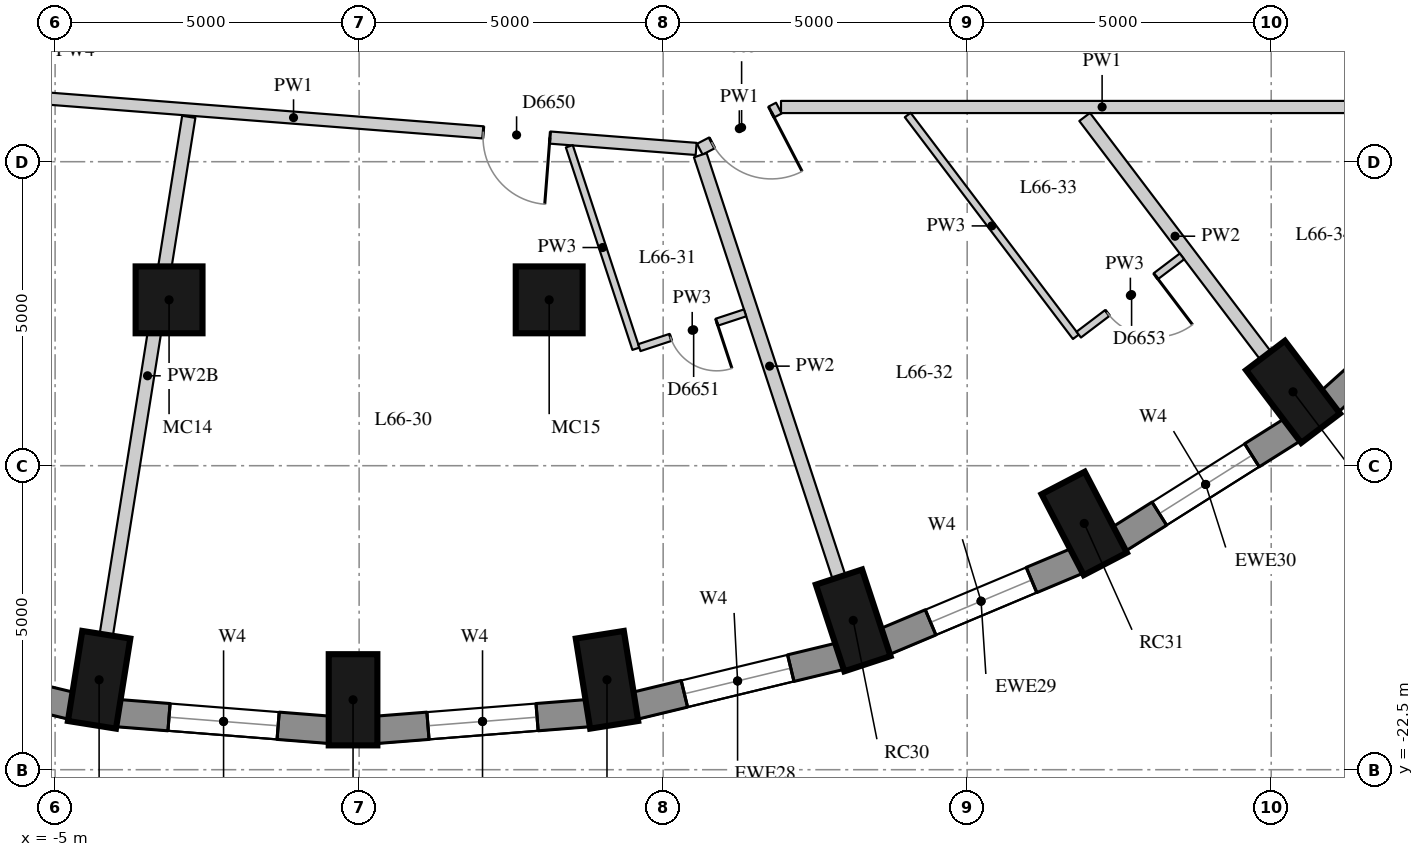
"""IFC4 building model, lengths in metres.
Left out: names, types, materials, properties, quantities, classifications, styles, units other than length and angle.
Written with IfcOpenShell. Run it as: python <this file> out.ifc"""

import sys

from ifc_helpers import new_model, si_unit, direction, frame, frame_2d, origin, origin_2d, place, context, subcontext, project, spatial, rectangle, extrude, element, fill, save


model = new_model("IFC4")
c1 = context("Model", 3, precision=1e-05, world=origin(), true_north=direction((0.0, 1.0)))
c2 = subcontext(c1, "Body", "Model", "MODEL_VIEW")
j1 = project(units=[si_unit("LENGTHUNIT", "METRE"), si_unit("PLANEANGLEUNIT", "RADIAN")], contexts=[c1])
p1 = place(None, origin())
s1 = spatial("IfcSite", under=j1, at=p1, CompositionType="ELEMENT")
p2 = place(p1, origin())
s2 = spatial("IfcBuilding", under=s1, at=p2, CompositionType="ELEMENT")
p3 = place(p2, frame((0.0, 0.0, 233.3)))
s3 = spatial("IfcBuildingStorey", under=s2, at=p3, CompositionType="ELEMENT", Elevation=233.3)
for number, where, z_axis, x_axis in (
    (1, (-4.276, -21.021, 0.0), (0.0, 0.0, 1.0), (-0.157, -0.988, 0.0)),
    (2, (-0.1, -21.35, 0.0), (0.0, 0.0, 1.0), (0.0, -1.0, 0.0)),
    (3, (4.076, -21.021, 0.0), (0.0, 0.0, 1.0), (0.157, -0.988, 0.0)),
    (4, (8.125, -20.044, 0.0), (0.0, 0.0, 1.0), (0.312, -0.95, 0.0)),
    (5, (11.925, -18.449, 0.0), (0.0, 0.0, 1.0), (0.462, -0.887, 0.0)),
    (6, (15.359, -16.285, 0.0), (0.0, 0.0, 1.0), (0.604, -0.797, 0.0)),
):
    element("IfcColumn", number, at=place(p3, frame(where, z_axis=z_axis, x_axis=x_axis)), inside=s3, PredefinedType="COLUMN", context=c2, shape_type="SweptSolid", body=[
        extrude(rectangle(XDim=1.5, YDim=0.8, at=origin_2d()), origin(), (0.0, 0.0, 1.0), 3.3),
    ])
for number, where, z_axis, x_axis in (
    (7, (-3.126, -14.772, 0.0), (0.0, 0.0, 1.0), (1.0, 0.0, 0.0)),
    (8, (3.126, -14.772, 0.0), (0.0, 0.0, 1.0), (1.0, 0.0, 0.0)),
):
    element("IfcColumn", number, at=place(p3, frame(where, z_axis=z_axis, x_axis=x_axis)), inside=s3, PredefinedType="COLUMN", context=c2, shape_type="SweptSolid", body=[
        extrude(rectangle(XDim=1.1, YDim=1.1, at=origin_2d()), origin(), (0.0, 0.0, 1.0), 3.3),
    ])
p4 = place(p3, frame((-8.119, -20.632, 0.0), z_axis=(0.0, 0.0, 1.0), x_axis=(0.972115243017, -0.234503633859, 0.0)))
e9 = element("IfcWall", 9, at=p4, inside=s3, PredefinedType="SOLIDWALL", context=c2, shape_type="SweptSolid", body=[
    extrude(rectangle(XDim=3.487, YDim=0.45, at=frame_2d((1.743, 0.0))), origin(), (0.0, 0.0, 1.0), 3.02),
])
p5 = place(p4, frame((0.843, 0.0, 0.4)))
e10 = element("IfcOpeningElement", 10, at=p5, cuts=e9, PredefinedType="OPENING", context=c2, shape_type="SweptSolid", body=[
    extrude(rectangle(XDim=1.8, YDim=1.75, at=frame_2d((0.9, 0.875))), frame((0.0, 0.235, 0.0), z_axis=(0.0, -1.0, 0.0), x_axis=(1.0, 0.0, 0.0)), (0.0, 0.0, 1.0), 0.47),
])
p6 = place(p3, frame((-3.979, -21.569, 0.0), z_axis=(0.0, 0.0, 1.0), x_axis=(0.996910775835, -0.078542377245, 0.0)))
e11 = element("IfcWall", 11, at=p6, inside=s3, PredefinedType="SOLIDWALL", context=c2, shape_type="SweptSolid", body=[
    extrude(rectangle(XDim=3.509, YDim=0.45, at=frame_2d((1.755, 0.0))), origin(), (0.0, 0.0, 1.0), 3.02),
])
p7 = place(p6, frame((0.855, 0.0, 0.4)))
e12 = element("IfcOpeningElement", 12, at=p7, cuts=e11, PredefinedType="OPENING", context=c2, shape_type="SweptSolid", body=[
    extrude(rectangle(XDim=1.8, YDim=1.75, at=frame_2d((0.9, 0.875))), frame((0.0, 0.235, 0.0), z_axis=(0.0, -1.0, 0.0), x_axis=(1.0, 0.0, 0.0)), (0.0, 0.0, 1.0), 0.47),
])
p8 = place(p3, frame((0.28, -21.844, 0.0), z_axis=(0.0, 0.0, 1.0), x_axis=(0.996910775835, 0.078542377245, 0.0)))
e13 = element("IfcWall", 13, at=p8, inside=s3, PredefinedType="SOLIDWALL", context=c2, shape_type="SweptSolid", body=[
    extrude(rectangle(XDim=3.509, YDim=0.45, at=frame_2d((1.755, 0.0))), origin(), (0.0, 0.0, 1.0), 3.02),
])
p9 = place(p8, frame((0.855, 0.0, 0.4)))
e14 = element("IfcOpeningElement", 14, at=p9, cuts=e13, PredefinedType="OPENING", context=c2, shape_type="SweptSolid", body=[
    extrude(rectangle(XDim=1.8, YDim=1.75, at=frame_2d((0.9, 0.875))), frame((0.0, 0.235, 0.0), z_axis=(0.0, -1.0, 0.0), x_axis=(1.0, 0.0, 0.0)), (0.0, 0.0, 1.0), 0.47),
])
p10 = place(p3, frame((4.529, -21.449, 0.0), z_axis=(0.0, 0.0, 1.0), x_axis=(0.972115243017, 0.234503633859, 0.0)))
e15 = element("IfcWall", 15, at=p10, inside=s3, PredefinedType="SOLIDWALL", context=c2, shape_type="SweptSolid", body=[
    extrude(rectangle(XDim=3.487, YDim=0.45, at=frame_2d((1.743, 0.0))), origin(), (0.0, 0.0, 1.0), 3.02),
])
p11 = place(p10, frame((0.843, 0.0, 0.4)))
e16 = element("IfcOpeningElement", 16, at=p11, cuts=e15, PredefinedType="OPENING", context=c2, shape_type="SweptSolid", body=[
    extrude(rectangle(XDim=1.8, YDim=1.75, at=frame_2d((0.9, 0.875))), frame((0.0, 0.235, 0.0), z_axis=(0.0, -1.0, 0.0), x_axis=(1.0, 0.0, 0.0)), (0.0, 0.0, 1.0), 0.47),
])
p12 = place(p3, frame((8.641, -20.395, 0.0), z_axis=(0.0, 0.0, 1.0), x_axis=(0.922049934692, 0.3870709469, 0.0)))
e17 = element("IfcWall", 17, at=p12, inside=s3, PredefinedType="SOLIDWALL", context=c2, shape_type="SweptSolid", body=[
    extrude(rectangle(XDim=3.443, YDim=0.45, at=frame_2d((1.722, 0.0))), origin(), (0.0, 0.0, 1.0), 3.02),
])
p13 = place(p12, frame((0.822, 0.0, 0.4)))
e18 = element("IfcOpeningElement", 18, at=p13, cuts=e17, PredefinedType="OPENING", context=c2, shape_type="SweptSolid", body=[
    extrude(rectangle(XDim=1.8, YDim=1.75, at=frame_2d((0.9, 0.875))), frame((0.0, 0.235, 0.0), z_axis=(0.0, -1.0, 0.0), x_axis=(1.0, 0.0, 0.0)), (0.0, 0.0, 1.0), 0.47),
])
p14 = place(p3, frame((12.49, -18.711, 0.0), z_axis=(0.0, 0.0, 1.0), x_axis=(0.845929139811, 0.53329531258, 0.0)))
e19 = element("IfcWall", 19, at=p14, inside=s3, PredefinedType="SOLIDWALL", context=c2, shape_type="SweptSolid", body=[
    extrude(rectangle(XDim=3.385, YDim=0.45, at=frame_2d((1.692, 0.0))), origin(), (0.0, 0.0, 1.0), 3.02),
])
p15 = place(p14, frame((0.792, 0.0, 0.4)))
e20 = element("IfcOpeningElement", 20, at=p15, cuts=e19, PredefinedType="OPENING", context=c2, shape_type="SweptSolid", body=[
    extrude(rectangle(XDim=1.8, YDim=1.75, at=frame_2d((0.9, 0.875))), frame((0.0, 0.235, 0.0), z_axis=(0.0, -1.0, 0.0), x_axis=(1.0, 0.0, 0.0)), (0.0, 0.0, 1.0), 0.47),
])
p16 = place(p3, frame((15.959, -16.448, 0.0), z_axis=(0.0, 0.0, 1.0), x_axis=(0.743166014219, 0.669107073128, 0.0)))
e21 = element("IfcWall", 21, at=p16, inside=s3, PredefinedType="SOLIDWALL", context=c2, shape_type="SweptSolid", body=[
    extrude(rectangle(XDim=3.316, YDim=0.45, at=frame_2d((1.658, 0.0))), origin(), (0.0, 0.0, 1.0), 3.02),
])
p17 = place(p3, frame((17.5, -11.6, 0.0), z_axis=(0.0, 0.0, 1.0), x_axis=(-1.0, 0.0, 0.0)))
e22 = element("IfcWall", 22, at=p17, inside=s3, PredefinedType="PARTITIONING", context=c2, shape_type="SweptSolid", body=[
    extrude(rectangle(XDim=10.562, YDim=0.2, at=frame_2d((5.281, 0.0))), origin(), (0.0, 0.0, 1.0), 3.02),
])
p18 = place(p3, frame((6.903, -11.619, 0.0), z_axis=(0.0, 0.0, 1.0), x_axis=(-0.887353179844, -0.461090375329, 0.0)))
e23 = element("IfcWall", 23, at=p18, inside=s3, PredefinedType="PARTITIONING", context=c2, shape_type="SweptSolid", body=[
    extrude(rectangle(XDim=1.465, YDim=0.2, at=frame_2d((0.732, 0.0))), origin(), (0.0, 0.0, 1.0), 3.02),
])
p19 = place(p18, frame((0.14, 0.0, 0.0)))
e24 = element("IfcOpeningElement", 24, at=p19, cuts=e23, PredefinedType="OPENING", context=c2, shape_type="SweptSolid", body=[
    extrude(rectangle(XDim=1.1, YDim=2.1, at=frame_2d((0.55, 1.05))), frame((0.0, 0.11, 0.0), z_axis=(0.0, -1.0, 0.0), x_axis=(1.0, 0.0, 0.0)), (0.0, 0.0, 1.0), 0.22),
])
p20 = place(p3, frame((5.542, -12.29, 0.0), z_axis=(0.0, 0.0, 1.0), x_axis=(-0.996994281558, 0.077475173702, 0.0)))
e25 = element("IfcWall", 25, at=p20, inside=s3, PredefinedType="PARTITIONING", context=c2, shape_type="SweptSolid", body=[
    extrude(rectangle(XDim=13.282, YDim=0.2, at=frame_2d((6.641, 0.0))), origin(), (0.0, 0.0, 1.0), 3.02),
])
p21 = place(p20, frame((2.412, 0.0, 0.0)))
e26 = element("IfcOpeningElement", 26, at=p21, cuts=e25, PredefinedType="OPENING", context=c2, shape_type="SweptSolid", body=[
    extrude(rectangle(XDim=1.1, YDim=2.1, at=frame_2d((0.55, 1.05))), frame((0.0, 0.11, 0.0), z_axis=(0.0, -1.0, 0.0), x_axis=(1.0, 0.0, 0.0)), (0.0, 0.0, 1.0), 0.22),
])
p22 = place(p3, frame((-4.158, -20.281, 0.0), z_axis=(0.0, 0.0, 1.0), x_axis=(0.157248675007, 0.987559038341, 0.0)))
e27 = element("IfcWall", 27, at=p22, inside=s3, PredefinedType="PARTITIONING", context=c2, shape_type="SweptSolid", body=[
    extrude(rectangle(XDim=8.626, YDim=0.22, at=frame_2d((4.313, 0.0))), origin(), (0.0, 0.0, 1.0), 2.57),
])
p23 = place(p3, frame((7.891, -19.332, 0.0), z_axis=(0.0, 0.0, 1.0), x_axis=(-0.312264049527, 0.949995349132, 0.0)))
e28 = element("IfcWall", 28, at=p23, inside=s3, PredefinedType="PARTITIONING", context=c2, shape_type="SweptSolid", body=[
    extrude(rectangle(XDim=7.304, YDim=0.22, at=frame_2d((3.652, 0.0))), origin(), (0.0, 0.0, 1.0), 3.02),
])
p24 = place(p3, frame((14.906, -15.687, 0.0), z_axis=(0.0, 0.0, 1.0), x_axis=(-0.604078206052, 0.796925041, 0.0)))
e29 = element("IfcWall", 29, at=p24, inside=s3, PredefinedType="PARTITIONING", context=c2, shape_type="SweptSolid", body=[
    extrude(rectangle(XDim=4.923, YDim=0.22, at=frame_2d((2.462, 0.0))), origin(), (0.0, 0.0, 1.0), 3.02),
])
p25 = place(p3, frame((3.457, -12.246, 0.0), z_axis=(0.0, 0.0, 1.0), x_axis=(0.312255646562, -0.949998111151, 0.0)))
e30 = element("IfcWall", 30, at=p25, inside=s3, PredefinedType="PARTITIONING", context=c2, shape_type="SweptSolid", body=[
    extrude(rectangle(XDim=3.506, YDim=0.12, at=frame_2d((1.753, 0.0))), origin(), (0.0, 0.0, 1.0), 3.02),
])
p26 = place(p3, frame((9.022, -11.732, 0.0), z_axis=(0.0, 0.0, 1.0), x_axis=(0.604079451594, -0.796924096863, 0.0)))
e31 = element("IfcWall", 31, at=p26, inside=s3, PredefinedType="PARTITIONING", context=c2, shape_type="SweptSolid", body=[
    extrude(rectangle(XDim=4.578, YDim=0.12, at=frame_2d((2.289, 0.0))), origin(), (0.0, 0.0, 1.0), 3.02),
])
p27 = place(p3, frame((4.608, -15.558, 0.0), z_axis=(0.0, 0.0, 1.0), x_axis=(0.949995576072, 0.312263359111, 0.0)))
e32 = element("IfcWall", 32, at=p27, inside=s3, PredefinedType="PARTITIONING", context=c2, shape_type="SweptSolid", body=[
    extrude(rectangle(XDim=1.83, YDim=0.12, at=frame_2d((0.915, 0.0))), origin(), (0.0, 0.0, 1.0), 3.02),
])
p28 = place(p27, frame((0.54, 0.0, 0.0)))
e33 = element("IfcOpeningElement", 33, at=p28, cuts=e32, PredefinedType="OPENING", context=c2, shape_type="SweptSolid", body=[
    extrude(rectangle(XDim=0.8, YDim=2.1, at=frame_2d((0.4, 1.05))), frame((0.0, 0.07, 0.0), z_axis=(0.0, -1.0, 0.0), x_axis=(1.0, 0.0, 0.0)), (0.0, 0.0, 1.0), 0.14),
])
p29 = place(p3, frame((11.835, -15.344, 0.0), z_axis=(0.0, 0.0, 1.0), x_axis=(0.79693666797, 0.604062866964, 0.0)))
e34 = element("IfcWall", 34, at=p29, inside=s3, PredefinedType="PARTITIONING", context=c2, shape_type="SweptSolid", body=[
    extrude(rectangle(XDim=2.13, YDim=0.12, at=frame_2d((1.065, 0.0))), origin(), (0.0, 0.0, 1.0), 3.02),
])
p30 = place(p29, frame((0.59, 0.0, 0.0)))
e35 = element("IfcOpeningElement", 35, at=p30, cuts=e34, PredefinedType="OPENING", context=c2, shape_type="SweptSolid", body=[
    extrude(rectangle(XDim=1.0, YDim=2.1, at=frame_2d((0.5, 1.05))), frame((0.0, 0.07, 0.0), z_axis=(0.0, -1.0, 0.0), x_axis=(1.0, 0.0, 0.0)), (0.0, 0.0, 1.0), 0.14),
])
p31 = place(p7, origin())
e36 = element("IfcWindow", 36, at=p31, inside=s3, PartitioningType="SINGLE_PANEL", PredefinedType="WINDOW", context=c2, shape_type="SweptSolid", body=[
    extrude(rectangle(XDim=1.8, YDim=1.75, at=frame_2d((0.9, 0.875))), frame((0.0, 0.035, 0.0), z_axis=(0.0, -1.0, 0.0), x_axis=(1.0, 0.0, 0.0)), (0.0, 0.0, 1.0), 0.06),
])
fill(e12, e36)
p32 = place(p9, origin())
e37 = element("IfcWindow", 37, at=p32, inside=s3, PartitioningType="SINGLE_PANEL", PredefinedType="WINDOW", context=c2, shape_type="SweptSolid", body=[
    extrude(rectangle(XDim=1.8, YDim=1.75, at=frame_2d((0.9, 0.875))), frame((0.0, 0.035, 0.0), z_axis=(0.0, -1.0, 0.0), x_axis=(1.0, 0.0, 0.0)), (0.0, 0.0, 1.0), 0.06),
])
fill(e14, e37)
p33 = place(p11, origin())
e38 = element("IfcWindow", 38, at=p33, inside=s3, PartitioningType="SINGLE_PANEL", PredefinedType="WINDOW", context=c2, shape_type="SweptSolid", body=[
    extrude(rectangle(XDim=1.8, YDim=1.75, at=frame_2d((0.9, 0.875))), frame((0.0, 0.035, 0.0), z_axis=(0.0, -1.0, 0.0), x_axis=(1.0, 0.0, 0.0)), (0.0, 0.0, 1.0), 0.06),
])
fill(e16, e38)
p34 = place(p13, origin())
e39 = element("IfcWindow", 39, at=p34, inside=s3, PartitioningType="SINGLE_PANEL", PredefinedType="WINDOW", context=c2, shape_type="SweptSolid", body=[
    extrude(rectangle(XDim=1.8, YDim=1.75, at=frame_2d((0.9, 0.875))), frame((0.0, 0.035, 0.0), z_axis=(0.0, -1.0, 0.0), x_axis=(1.0, 0.0, 0.0)), (0.0, 0.0, 1.0), 0.06),
])
fill(e18, e39)
p35 = place(p15, origin())
e40 = element("IfcWindow", 40, at=p35, inside=s3, PartitioningType="SINGLE_PANEL", PredefinedType="WINDOW", context=c2, shape_type="SweptSolid", body=[
    extrude(rectangle(XDim=1.8, YDim=1.75, at=frame_2d((0.9, 0.875))), frame((0.0, 0.035, 0.0), z_axis=(0.0, -1.0, 0.0), x_axis=(1.0, 0.0, 0.0)), (0.0, 0.0, 1.0), 0.06),
])
fill(e20, e40)
p36 = place(p21, origin())
e41 = element("IfcDoor", 41, at=p36, inside=s3, OperationType="SINGLE_SWING_LEFT", PredefinedType="DOOR", context=c2, shape_type="SweptSolid", body=[
    extrude(rectangle(XDim=1.1, YDim=2.1, at=frame_2d((0.55, 1.05))), frame((0.0, 0.025, 0.0), z_axis=(0.0, -1.0, 0.0), x_axis=(1.0, 0.0, 0.0)), (0.0, 0.0, 1.0), 0.05),
])
fill(e26, e41)
p37 = place(p28, origin())
e42 = element("IfcDoor", 42, at=p37, inside=s3, OperationType="SINGLE_SWING_LEFT", PredefinedType="DOOR", context=c2, shape_type="SweptSolid", body=[
    extrude(rectangle(XDim=0.8, YDim=2.1, at=frame_2d((0.4, 1.05))), frame((0.0, 0.025, 0.0), z_axis=(0.0, -1.0, 0.0), x_axis=(1.0, 0.0, 0.0)), (0.0, 0.0, 1.0), 0.05),
])
fill(e33, e42)
p38 = place(p19, origin())
e43 = element("IfcDoor", 43, at=p38, inside=s3, OperationType="SINGLE_SWING_LEFT", PredefinedType="DOOR", context=c2, shape_type="SweptSolid", body=[
    extrude(rectangle(XDim=1.1, YDim=2.1, at=frame_2d((0.55, 1.05))), frame((0.0, 0.025, 0.0), z_axis=(0.0, -1.0, 0.0), x_axis=(1.0, 0.0, 0.0)), (0.0, 0.0, 1.0), 0.05),
])
fill(e24, e43)
p39 = place(p30, origin())
e44 = element("IfcDoor", 44, at=p39, inside=s3, OperationType="SINGLE_SWING_LEFT", PredefinedType="DOOR", context=c2, shape_type="SweptSolid", body=[
    extrude(rectangle(XDim=1.0, YDim=2.1, at=frame_2d((0.5, 1.05))), frame((0.0, 0.025, 0.0), z_axis=(0.0, -1.0, 0.0), x_axis=(1.0, 0.0, 0.0)), (0.0, 0.0, 1.0), 0.05),
])
fill(e35, e44)
save(model, sys.argv[1])
